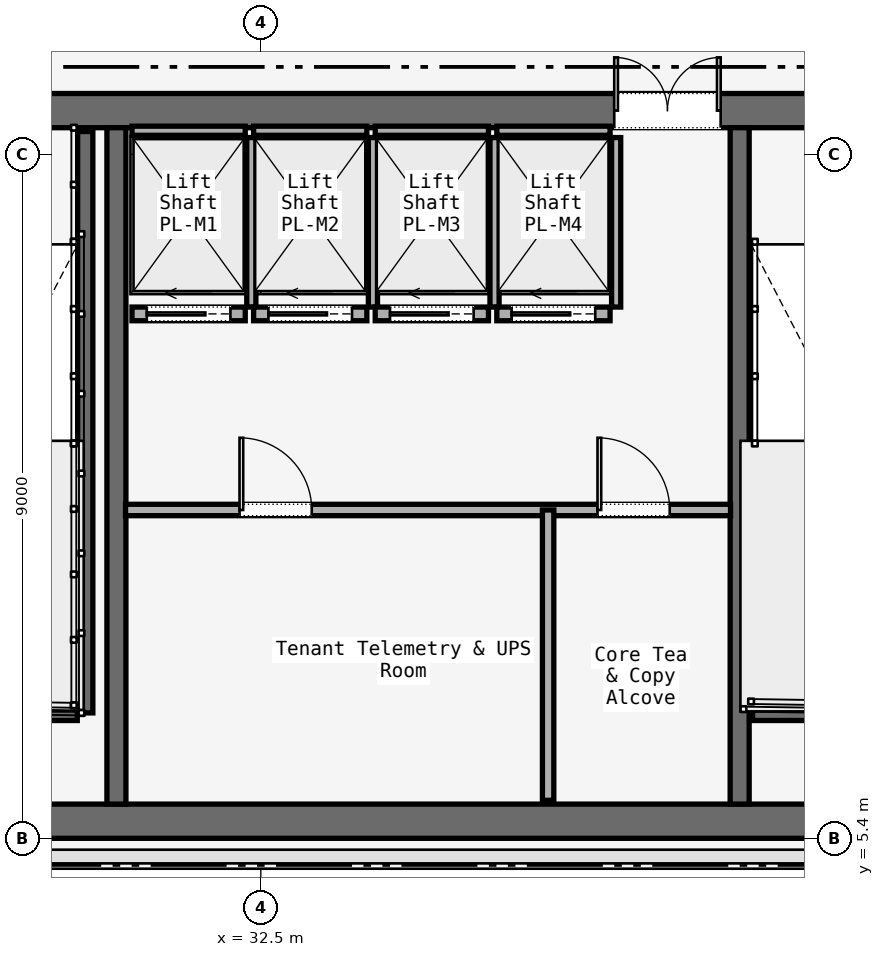
"""IFC4 building model, lengths in metres.
Left out: names, types, materials, properties, quantities, classifications, styles, units other than length and angle.
Written with IfcOpenShell. Run it as: python <this file> out.ifc"""

import sys

from ifc_helpers import new_model, si_unit, direction, frame, frame_2d, origin, place, context, subcontext, project, spatial, rectangle, extrude, element, fill, save


model = new_model("IFC4")
c1 = context("Model", 3, precision=1e-05, world=origin(), true_north=direction((0.0, 1.0)))
c2 = subcontext(c1, "Body", "Model", "MODEL_VIEW")
j1 = project(units=[si_unit("LENGTHUNIT", "METRE"), si_unit("PLANEANGLEUNIT", "RADIAN")], contexts=[c1])
p1 = place(None, origin())
s1 = spatial("IfcSite", under=j1, at=p1, CompositionType="ELEMENT")
p2 = place(p1, origin())
s2 = spatial("IfcBuilding", under=s1, at=p2, CompositionType="ELEMENT")
p3 = place(p2, frame((0.0, 0.0, 127.0)))
s3 = spatial("IfcBuildingStorey", under=s2, at=p3, CompositionType="ELEMENT", Elevation=127.0)
p4 = place(p3, frame((26.45, 14.975, 0.0), z_axis=(0.0, 0.0, 1.0), x_axis=(1.0, 0.0, 0.0)))
e1 = element("IfcWall", 1, at=p4, inside=s3, PredefinedType="SOLIDWALL", context=c2, shape_type="SweptSolid", body=[
    extrude(rectangle(XDim=31.1, YDim=0.45, at=frame_2d((15.55, 0.0))), origin(), (0.0, 0.0, 1.0), 3.58),
])
p5 = place(p4, frame((1.65, 0.0, 0.0)))
e2 = element("IfcOpeningElement", 2, at=p5, cuts=e1, PredefinedType="OPENING", context=c2, shape_type="SweptSolid", body=[
    extrude(rectangle(XDim=1.1, YDim=2.2, at=frame_2d((0.55, 1.1))), frame((0.0, 0.225, 0.0), z_axis=(0.0, -1.0, 0.0), x_axis=(1.0, 0.0, 0.0)), (0.0, 0.0, 1.0), 0.45),
])
p6 = place(p4, frame((13.65, 0.0, 0.0)))
e3 = element("IfcOpeningElement", 3, at=p6, cuts=e1, PredefinedType="OPENING", context=c2, shape_type="SweptSolid", body=[
    extrude(rectangle(XDim=1.1, YDim=2.2, at=frame_2d((0.55, 1.1))), frame((0.0, 0.225, 0.0), z_axis=(0.0, -1.0, 0.0), x_axis=(1.0, 0.0, 0.0)), (0.0, 0.0, 1.0), 0.45),
])
p7 = place(p4, frame((25.55, 0.0, 0.0)))
e4 = element("IfcOpeningElement", 4, at=p7, cuts=e1, PredefinedType="OPENING", context=c2, shape_type="SweptSolid", body=[
    extrude(rectangle(XDim=1.1, YDim=2.2, at=frame_2d((0.55, 1.1))), frame((0.0, 0.225, 0.0), z_axis=(0.0, -1.0, 0.0), x_axis=(1.0, 0.0, 0.0)), (0.0, 0.0, 1.0), 0.45),
])
p8 = place(p4, frame((10.7, 0.0, 0.0)))
e5 = element("IfcOpeningElement", 5, at=p8, cuts=e1, PredefinedType="OPENING", context=c2, shape_type="SweptSolid", body=[
    extrude(rectangle(XDim=1.4, YDim=2.2, at=frame_2d((0.7, 1.1))), frame((0.0, 0.225, 0.0), z_axis=(0.0, -1.0, 0.0), x_axis=(1.0, 0.0, 0.0)), (0.0, 0.0, 1.0), 0.45),
])
p9 = place(p4, frame((19.35, 0.0, 0.0)))
e6 = element("IfcOpeningElement", 6, at=p9, cuts=e1, PredefinedType="OPENING", context=c2, shape_type="SweptSolid", body=[
    extrude(rectangle(XDim=1.1, YDim=2.2, at=frame_2d((0.55, 1.1))), frame((0.0, 0.225, 0.0), z_axis=(0.0, -1.0, 0.0), x_axis=(1.0, 0.0, 0.0)), (0.0, 0.0, 1.0), 0.45),
])
p10 = place(p4, frame((21.4, 0.0, 0.0)))
e7 = element("IfcOpeningElement", 7, at=p10, cuts=e1, PredefinedType="OPENING", context=c2, shape_type="SweptSolid", body=[
    extrude(rectangle(XDim=0.9, YDim=2.1, at=frame_2d((0.45, 1.05))), frame((0.0, 0.225, 0.0), z_axis=(0.0, -1.0, 0.0), x_axis=(1.0, 0.0, 0.0)), (0.0, 0.0, 1.0), 0.45),
])
p11 = place(p4, frame((23.35, 0.0, 0.0)))
e8 = element("IfcOpeningElement", 8, at=p11, cuts=e1, PredefinedType="OPENING", context=c2, shape_type="SweptSolid", body=[
    extrude(rectangle(XDim=1.3, YDim=2.3, at=frame_2d((0.65, 1.15))), frame((0.0, 0.225, 0.0), z_axis=(0.0, -1.0, 0.0), x_axis=(1.0, 0.0, 0.0)), (0.0, 0.0, 1.0), 0.45),
])
p12 = place(p3, frame((26.45, 5.625, 0.0), z_axis=(0.0, 0.0, 1.0), x_axis=(1.0, 0.0, 0.0)))
e9 = element("IfcWall", 9, at=p12, inside=s3, PredefinedType="SOLIDWALL", context=c2, shape_type="SweptSolid", body=[
    extrude(rectangle(XDim=31.1, YDim=0.45, at=frame_2d((15.55, 0.0))), origin(), (0.0, 0.0, 1.0), 3.58),
])
for number, where, z_axis, x_axis in (
    (10, (30.6, 5.85, 0.0), (0.0, 0.0, 1.0), (0.0, 1.0, 0.0)),
    (11, (38.8, 5.85, 0.0), (0.0, 0.0, 1.0), (0.0, 1.0, 0.0)),
):
    element("IfcWall", number, at=place(p3, frame(where, z_axis=z_axis, x_axis=x_axis)), inside=s3, PredefinedType="SOLIDWALL", context=c2, shape_type="SweptSolid", body=[
        extrude(rectangle(XDim=8.9, YDim=0.25, at=frame_2d((4.45, 0.0))), origin(), (0.0, 0.0, 1.0), 3.58),
    ])
p13 = place(p3, frame((30.19, 14.7, 0.0), z_axis=(0.0, 0.0, 1.0), x_axis=(0.0, -1.0, 0.0)))
e12 = element("IfcWall", 12, at=p13, inside=s3, PredefinedType="SOLIDWALL", context=c2, shape_type="SweptSolid", body=[
    extrude(rectangle(XDim=7.65, YDim=0.2, at=frame_2d((3.825, 0.0))), origin(), (0.0, 0.0, 1.0), 3.8),
])
for number, where, z_axis, x_axis in (
    (13, (26.97, 7.05, 0.0), (0.0, 0.0, 1.0), (1.0, 0.0, 0.0)),
    (14, (38.97, 7.05, 0.0), (0.0, 0.0, 1.0), (1.0, 0.0, 0.0)),
):
    element("IfcWall", number, at=place(p3, frame(where, z_axis=z_axis, x_axis=x_axis)), inside=s3, PredefinedType="SOLIDWALL", context=c2, shape_type="SweptSolid", body=[
        extrude(rectangle(XDim=3.115, YDim=0.2, at=frame_2d((1.558, 0.0))), origin(), (0.0, 0.0, 1.0), 3.8),
    ])
p14 = place(p3, frame((30.72, 9.72, 0.0), z_axis=(0.0, 0.0, 1.0), x_axis=(1.0, 0.0, 0.0)))
e15 = element("IfcWall", 15, at=p14, inside=s3, PredefinedType="PARTITIONING", context=c2, shape_type="SweptSolid", body=[
    extrude(rectangle(XDim=7.96, YDim=0.15, at=frame_2d((3.98, 0.0))), origin(), (0.0, 0.0, 1.0), 3.01),
])
p15 = place(p14, frame((1.5, 0.0, 0.0)))
e16 = element("IfcOpeningElement", 16, at=p15, cuts=e15, PredefinedType="OPENING", context=c2, shape_type="SweptSolid", body=[
    extrude(rectangle(XDim=0.95, YDim=2.2, at=frame_2d((0.475, 1.1))), frame((0.0, 0.075, 0.0), z_axis=(0.0, -1.0, 0.0), x_axis=(1.0, 0.0, 0.0)), (0.0, 0.0, 1.0), 0.15),
])
p16 = place(p14, frame((6.21, 0.0, 0.0)))
e17 = element("IfcOpeningElement", 17, at=p16, cuts=e15, PredefinedType="OPENING", context=c2, shape_type="SweptSolid", body=[
    extrude(rectangle(XDim=0.95, YDim=2.2, at=frame_2d((0.475, 1.1))), frame((0.0, 0.075, 0.0), z_axis=(0.0, -1.0, 0.0), x_axis=(1.0, 0.0, 0.0)), (0.0, 0.0, 1.0), 0.15),
])
p17 = place(p3, frame((36.28, 5.9, 0.0), z_axis=(0.0, 0.0, 1.0), x_axis=(0.0, 1.0, 0.0)))
e18 = element("IfcWall", 18, at=p17, inside=s3, PredefinedType="PARTITIONING", context=c2, shape_type="SweptSolid", body=[
    extrude(rectangle(XDim=3.82, YDim=0.15, at=frame_2d((1.91, 0.0))), origin(), (0.0, 0.0, 1.0), 3.01),
])
p18 = place(p3, frame((30.805, 12.3, 0.0), z_axis=(0.0, 0.0, 1.0), x_axis=(1.0, 0.0, 0.0)))
e19 = element("IfcWall", 19, at=p18, inside=s3, PredefinedType="SOLIDWALL", context=c2, shape_type="SweptSolid", body=[
    extrude(rectangle(XDim=1.49, YDim=0.18, at=frame_2d((0.745, 0.0))), origin(), (0.0, 0.0, 1.0), 3.01),
])
p19 = place(p18, frame((0.195, 0.0, 0.0)))
e20 = element("IfcOpeningElement", 20, at=p19, cuts=e19, PredefinedType="OPENING", context=c2, shape_type="SweptSolid", body=[
    extrude(rectangle(XDim=1.1, YDim=2.2, at=frame_2d((0.55, 1.1))), frame((0.0, 0.09, 0.0), z_axis=(0.0, -1.0, 0.0), x_axis=(1.0, 0.0, 0.0)), (0.0, 0.0, 1.0), 0.18),
])
p20 = place(p3, frame((30.805, 14.71, 0.0), z_axis=(0.0, 0.0, 1.0), x_axis=(1.0, 0.0, 0.0)))
e21 = element("IfcWall", 21, at=p20, inside=s3, PredefinedType="SOLIDWALL", context=c2, shape_type="SweptSolid", body=[
    extrude(rectangle(XDim=1.49, YDim=0.12, at=frame_2d((0.745, 0.0))), origin(), (0.0, 0.0, 1.0), 3.01),
])
p21 = place(p3, frame((32.375, 12.39, 0.0), z_axis=(0.0, 0.0, 1.0), x_axis=(0.0, 1.0, 0.0)))
e22 = element("IfcWall", 22, at=p21, inside=s3, PredefinedType="SOLIDWALL", context=c2, shape_type="SweptSolid", body=[
    extrude(rectangle(XDim=2.23, YDim=0.12, at=frame_2d((1.115, 0.0))), origin(), (0.0, 0.0, 1.0), 3.01),
])
p22 = place(p3, frame((32.405, 12.3, 0.0), z_axis=(0.0, 0.0, 1.0), x_axis=(1.0, 0.0, 0.0)))
e23 = element("IfcWall", 23, at=p22, inside=s3, PredefinedType="SOLIDWALL", context=c2, shape_type="SweptSolid", body=[
    extrude(rectangle(XDim=1.49, YDim=0.18, at=frame_2d((0.745, 0.0))), origin(), (0.0, 0.0, 1.0), 3.01),
])
p23 = place(p22, frame((0.195, 0.0, 0.0)))
e24 = element("IfcOpeningElement", 24, at=p23, cuts=e23, PredefinedType="OPENING", context=c2, shape_type="SweptSolid", body=[
    extrude(rectangle(XDim=1.1, YDim=2.2, at=frame_2d((0.55, 1.1))), frame((0.0, 0.09, 0.0), z_axis=(0.0, -1.0, 0.0), x_axis=(1.0, 0.0, 0.0)), (0.0, 0.0, 1.0), 0.18),
])
p24 = place(p3, frame((32.405, 14.71, 0.0), z_axis=(0.0, 0.0, 1.0), x_axis=(1.0, 0.0, 0.0)))
e25 = element("IfcWall", 25, at=p24, inside=s3, PredefinedType="SOLIDWALL", context=c2, shape_type="SweptSolid", body=[
    extrude(rectangle(XDim=1.49, YDim=0.12, at=frame_2d((0.745, 0.0))), origin(), (0.0, 0.0, 1.0), 3.01),
])
p25 = place(p3, frame((33.975, 12.39, 0.0), z_axis=(0.0, 0.0, 1.0), x_axis=(0.0, 1.0, 0.0)))
e26 = element("IfcWall", 26, at=p25, inside=s3, PredefinedType="SOLIDWALL", context=c2, shape_type="SweptSolid", body=[
    extrude(rectangle(XDim=2.23, YDim=0.12, at=frame_2d((1.115, 0.0))), origin(), (0.0, 0.0, 1.0), 3.01),
])
p26 = place(p3, frame((34.005, 12.3, 0.0), z_axis=(0.0, 0.0, 1.0), x_axis=(1.0, 0.0, 0.0)))
e27 = element("IfcWall", 27, at=p26, inside=s3, PredefinedType="SOLIDWALL", context=c2, shape_type="SweptSolid", body=[
    extrude(rectangle(XDim=1.49, YDim=0.18, at=frame_2d((0.745, 0.0))), origin(), (0.0, 0.0, 1.0), 3.01),
])
p27 = place(p26, frame((0.195, 0.0, 0.0)))
e28 = element("IfcOpeningElement", 28, at=p27, cuts=e27, PredefinedType="OPENING", context=c2, shape_type="SweptSolid", body=[
    extrude(rectangle(XDim=1.1, YDim=2.2, at=frame_2d((0.55, 1.1))), frame((0.0, 0.09, 0.0), z_axis=(0.0, -1.0, 0.0), x_axis=(1.0, 0.0, 0.0)), (0.0, 0.0, 1.0), 0.18),
])
p28 = place(p3, frame((34.005, 14.71, 0.0), z_axis=(0.0, 0.0, 1.0), x_axis=(1.0, 0.0, 0.0)))
e29 = element("IfcWall", 29, at=p28, inside=s3, PredefinedType="SOLIDWALL", context=c2, shape_type="SweptSolid", body=[
    extrude(rectangle(XDim=1.49, YDim=0.12, at=frame_2d((0.745, 0.0))), origin(), (0.0, 0.0, 1.0), 3.01),
])
p29 = place(p3, frame((35.575, 12.39, 0.0), z_axis=(0.0, 0.0, 1.0), x_axis=(0.0, 1.0, 0.0)))
e30 = element("IfcWall", 30, at=p29, inside=s3, PredefinedType="SOLIDWALL", context=c2, shape_type="SweptSolid", body=[
    extrude(rectangle(XDim=2.23, YDim=0.12, at=frame_2d((1.115, 0.0))), origin(), (0.0, 0.0, 1.0), 3.01),
])
p30 = place(p3, frame((35.605, 12.3, 0.0), z_axis=(0.0, 0.0, 1.0), x_axis=(1.0, 0.0, 0.0)))
e31 = element("IfcWall", 31, at=p30, inside=s3, PredefinedType="SOLIDWALL", context=c2, shape_type="SweptSolid", body=[
    extrude(rectangle(XDim=1.49, YDim=0.18, at=frame_2d((0.745, 0.0))), origin(), (0.0, 0.0, 1.0), 3.01),
])
p31 = place(p30, frame((0.195, 0.0, 0.0)))
e32 = element("IfcOpeningElement", 32, at=p31, cuts=e31, PredefinedType="OPENING", context=c2, shape_type="SweptSolid", body=[
    extrude(rectangle(XDim=1.1, YDim=2.2, at=frame_2d((0.55, 1.1))), frame((0.0, 0.09, 0.0), z_axis=(0.0, -1.0, 0.0), x_axis=(1.0, 0.0, 0.0)), (0.0, 0.0, 1.0), 0.18),
])
p32 = place(p3, frame((35.605, 14.71, 0.0), z_axis=(0.0, 0.0, 1.0), x_axis=(1.0, 0.0, 0.0)))
e33 = element("IfcWall", 33, at=p32, inside=s3, PredefinedType="SOLIDWALL", context=c2, shape_type="SweptSolid", body=[
    extrude(rectangle(XDim=1.49, YDim=0.12, at=frame_2d((0.745, 0.0))), origin(), (0.0, 0.0, 1.0), 3.01),
])
p33 = place(p3, frame((37.175, 12.39, 0.0), z_axis=(0.0, 0.0, 1.0), x_axis=(0.0, 1.0, 0.0)))
e34 = element("IfcWall", 34, at=p33, inside=s3, PredefinedType="SOLIDWALL", context=c2, shape_type="SweptSolid", body=[
    extrude(rectangle(XDim=2.23, YDim=0.12, at=frame_2d((1.115, 0.0))), origin(), (0.0, 0.0, 1.0), 3.01),
])
p34 = place(p8, origin())
e35 = element("IfcDoor", 35, at=p34, inside=s3, OperationType="DOUBLE_DOOR_SINGLE_SWING", PredefinedType="DOOR", context=c2, shape_type="SweptSolid", body=[
    extrude(rectangle(XDim=1.4, YDim=2.2, at=frame_2d((0.7, 1.1))), frame((0.0, 0.025, 0.0), z_axis=(0.0, -1.0, 0.0), x_axis=(1.0, 0.0, 0.0)), (0.0, 0.0, 1.0), 0.05),
])
fill(e5, e35)
p35 = place(p15, origin())
e36 = element("IfcDoor", 36, at=p35, inside=s3, OperationType="SINGLE_SWING_LEFT", PredefinedType="DOOR", context=c2, shape_type="SweptSolid", body=[
    extrude(rectangle(XDim=0.95, YDim=2.2, at=frame_2d((0.475, 1.1))), frame((0.0, 0.025, 0.0), z_axis=(0.0, -1.0, 0.0), x_axis=(1.0, 0.0, 0.0)), (0.0, 0.0, 1.0), 0.05),
])
fill(e16, e36)
p36 = place(p16, origin())
e37 = element("IfcDoor", 37, at=p36, inside=s3, OperationType="SINGLE_SWING_RIGHT", PredefinedType="DOOR", context=c2, shape_type="SweptSolid", body=[
    extrude(rectangle(XDim=0.95, YDim=2.2, at=frame_2d((0.475, 1.1))), frame((0.0, 0.025, 0.0), z_axis=(0.0, -1.0, 0.0), x_axis=(1.0, 0.0, 0.0)), (0.0, 0.0, 1.0), 0.05),
])
fill(e17, e37)
p37 = place(p19, origin())
e38 = element("IfcDoor", 38, at=p37, inside=s3, OperationType="SLIDING_TO_LEFT", PredefinedType="DOOR", context=c2, shape_type="SweptSolid", body=[
    extrude(rectangle(XDim=1.1, YDim=2.2, at=frame_2d((0.55, 1.1))), frame((0.0, 0.025, 0.0), z_axis=(0.0, -1.0, 0.0), x_axis=(1.0, 0.0, 0.0)), (0.0, 0.0, 1.0), 0.05),
])
fill(e20, e38)
p38 = place(p23, origin())
e39 = element("IfcDoor", 39, at=p38, inside=s3, OperationType="SLIDING_TO_LEFT", PredefinedType="DOOR", context=c2, shape_type="SweptSolid", body=[
    extrude(rectangle(XDim=1.1, YDim=2.2, at=frame_2d((0.55, 1.1))), frame((0.0, 0.025, 0.0), z_axis=(0.0, -1.0, 0.0), x_axis=(1.0, 0.0, 0.0)), (0.0, 0.0, 1.0), 0.05),
])
fill(e24, e39)
p39 = place(p27, origin())
e40 = element("IfcDoor", 40, at=p39, inside=s3, OperationType="SLIDING_TO_LEFT", PredefinedType="DOOR", context=c2, shape_type="SweptSolid", body=[
    extrude(rectangle(XDim=1.1, YDim=2.2, at=frame_2d((0.55, 1.1))), frame((0.0, 0.025, 0.0), z_axis=(0.0, -1.0, 0.0), x_axis=(1.0, 0.0, 0.0)), (0.0, 0.0, 1.0), 0.05),
])
fill(e28, e40)
p40 = place(p31, origin())
e41 = element("IfcDoor", 41, at=p40, inside=s3, OperationType="SLIDING_TO_LEFT", PredefinedType="DOOR", context=c2, shape_type="SweptSolid", body=[
    extrude(rectangle(XDim=1.1, YDim=2.2, at=frame_2d((0.55, 1.1))), frame((0.0, 0.025, 0.0), z_axis=(0.0, -1.0, 0.0), x_axis=(1.0, 0.0, 0.0)), (0.0, 0.0, 1.0), 0.05),
])
fill(e32, e41)
save(model, sys.argv[1])
